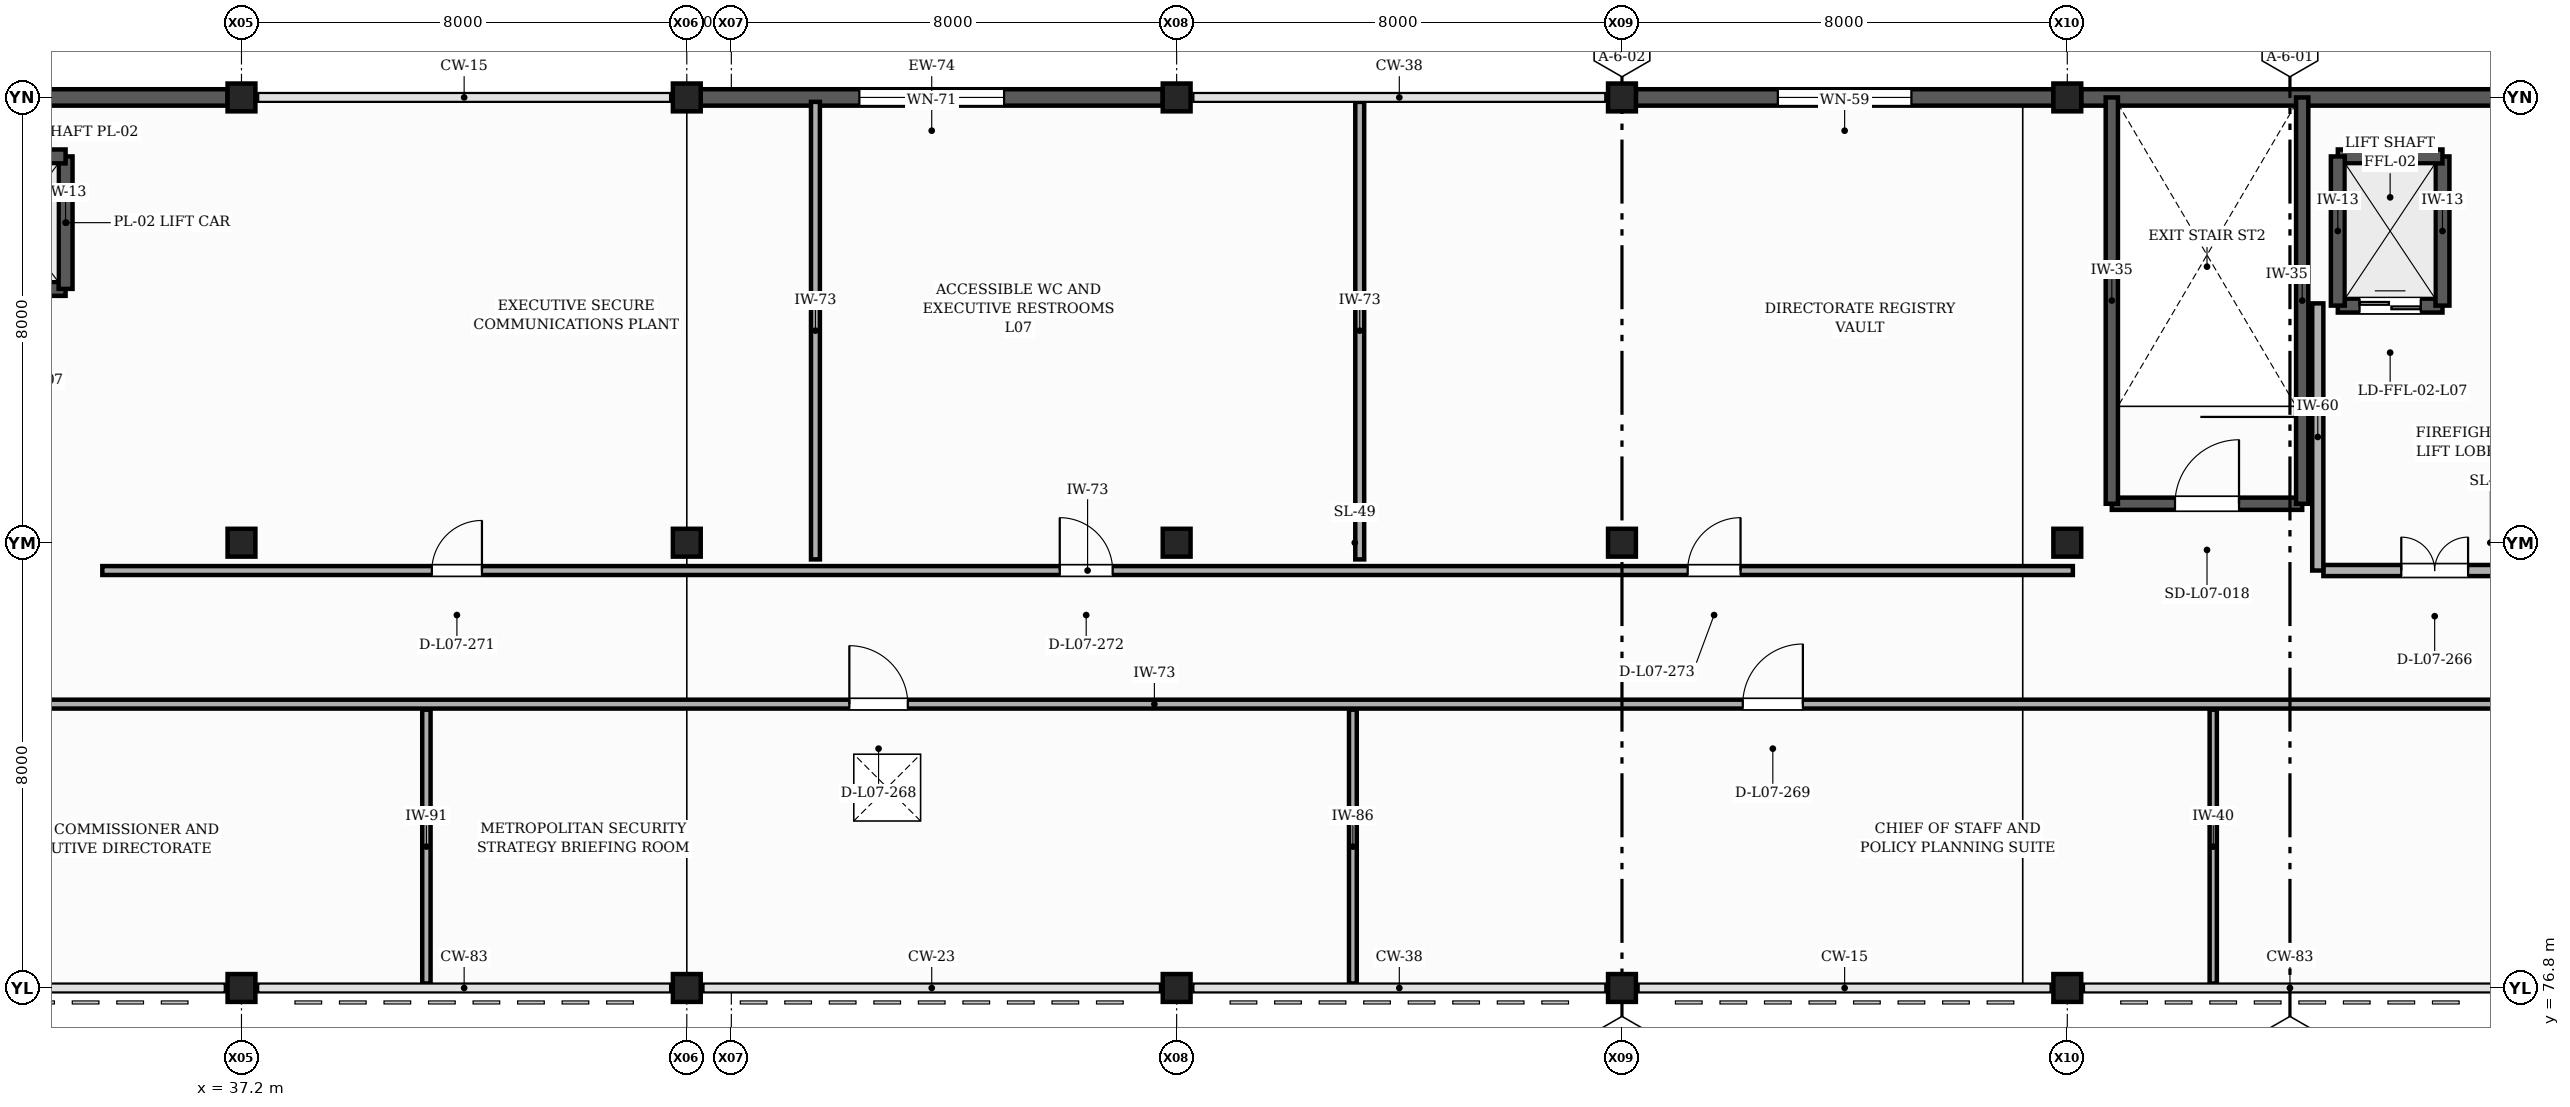
"""IFC4 building model, lengths in metres.
Left out: names, types, materials, properties, quantities, classifications, styles, units other than length and angle.
Written with IfcOpenShell. Run it as: python <this file> out.ifc"""

import sys

from ifc_helpers import new_model, si_unit, direction, frame, frame_2d, origin, origin_2d, place, context, subcontext, project, spatial, rectangle, extrude, element, fill, save


model = new_model("IFC4")
c1 = context("Model", 3, precision=1e-05, world=origin(), true_north=direction((0.0, 1.0)))
c2 = subcontext(c1, "Body", "Model", "MODEL_VIEW")
j1 = project(units=[si_unit("LENGTHUNIT", "METRE"), si_unit("PLANEANGLEUNIT", "RADIAN")], contexts=[c1])
p1 = place(None, origin())
s1 = spatial("IfcSite", under=j1, at=p1, CompositionType="ELEMENT")
p2 = place(p1, origin())
s2 = spatial("IfcBuilding", under=s1, at=p2, CompositionType="ELEMENT")
p3 = place(p2, frame((0.0, 0.0, 29.7)))
s3 = spatial("IfcBuildingStorey", under=s2, at=p3, CompositionType="ELEMENT", Elevation=29.7)
for number, where, z_axis, x_axis in (
    (1, (37.2, 76.8, 0.0), (0.0, 0.0, 1.0), (1.0, 0.0, 0.0)),
    (2, (37.2, 84.8, 0.0), (0.0, 0.0, 1.0), (1.0, 0.0, 0.0)),
    (3, (37.2, 92.8, 0.0), (0.0, 0.0, 1.0), (1.0, 0.0, 0.0)),
    (4, (45.2, 76.8, 0.0), (0.0, 0.0, 1.0), (1.0, 0.0, 0.0)),
    (5, (45.2, 84.8, 0.0), (0.0, 0.0, 1.0), (1.0, 0.0, 0.0)),
    (6, (45.2, 92.8, 0.0), (0.0, 0.0, 1.0), (1.0, 0.0, 0.0)),
    (7, (54.0, 76.8, 0.0), (0.0, 0.0, 1.0), (1.0, 0.0, 0.0)),
    (8, (54.0, 84.8, 0.0), (0.0, 0.0, 1.0), (1.0, 0.0, 0.0)),
    (9, (54.0, 92.8, 0.0), (0.0, 0.0, 1.0), (1.0, 0.0, 0.0)),
    (10, (62.0, 76.8, 0.0), (0.0, 0.0, 1.0), (1.0, 0.0, 0.0)),
    (11, (62.0, 84.8, 0.0), (0.0, 0.0, 1.0), (1.0, 0.0, 0.0)),
    (12, (62.0, 92.8, 0.0), (0.0, 0.0, 1.0), (1.0, 0.0, 0.0)),
    (13, (70.0, 76.8, 0.0), (0.0, 0.0, 1.0), (1.0, 0.0, 0.0)),
    (14, (70.0, 84.8, 0.0), (0.0, 0.0, 1.0), (1.0, 0.0, 0.0)),
    (15, (70.0, 92.8, 0.0), (0.0, 0.0, 1.0), (1.0, 0.0, 0.0)),
):
    element("IfcColumn", number, at=place(p3, frame(where, z_axis=z_axis, x_axis=x_axis)), inside=s3, PredefinedType="COLUMN", context=c2, shape_type="SweptSolid", body=[
        extrude(rectangle(XDim=0.5, YDim=0.5, at=origin_2d()), origin(), (0.0, 0.0, 1.0), 3.9),
    ])
p4 = place(p3, frame((77.75, 92.8, 0.0), z_axis=(0.0, 0.0, 1.0), x_axis=(-1.0, 0.0, 0.0)))
e16 = element("IfcWall", 16, at=p4, inside=s3, PredefinedType="SOLIDWALL", context=c2, shape_type="SweptSolid", body=[
    extrude(rectangle(XDim=7.5, YDim=0.295, at=frame_2d((3.75, 0.0))), origin(), (0.0, 0.0, 1.0), 3.64),
])
p5 = place(p3, frame((69.75, 92.8, 0.0), z_axis=(0.0, 0.0, 1.0), x_axis=(-1.0, 0.0, 0.0)))
e17 = element("IfcWall", 17, at=p5, inside=s3, PredefinedType="SOLIDWALL", context=c2, shape_type="SweptSolid", body=[
    extrude(rectangle(XDim=7.5, YDim=0.295, at=frame_2d((3.75, 0.0))), origin(), (0.0, 0.0, 1.0), 2.98),
])
p6 = place(p5, frame((2.55, 0.0, 0.9)))
e18 = element("IfcOpeningElement", 18, at=p6, cuts=e17, PredefinedType="OPENING", context=c2, shape_type="SweptSolid", body=[
    extrude(rectangle(XDim=2.4, YDim=1.5, at=frame_2d((1.2, 0.75))), frame((0.0, 0.157, 0.0), z_axis=(0.0, -1.0, 0.0), x_axis=(1.0, 0.0, 0.0)), (0.0, 0.0, 1.0), 0.315),
])
p7 = place(p3, frame((53.75, 92.8, 0.0), z_axis=(0.0, 0.0, 1.0), x_axis=(-1.0, 0.0, 0.0)))
e19 = element("IfcWall", 19, at=p7, inside=s3, PredefinedType="SOLIDWALL", context=c2, shape_type="SweptSolid", body=[
    extrude(rectangle(XDim=8.3, YDim=0.295, at=frame_2d((4.15, 0.0))), origin(), (0.0, 0.0, 1.0), 2.98),
])
p8 = place(p7, frame((2.85, 0.0, 0.9)))
e20 = element("IfcOpeningElement", 20, at=p8, cuts=e19, PredefinedType="OPENING", context=c2, shape_type="SweptSolid", body=[
    extrude(rectangle(XDim=2.6, YDim=1.8, at=frame_2d((1.3, 0.9))), frame((0.0, 0.157, 0.0), z_axis=(0.0, -1.0, 0.0), x_axis=(1.0, 0.0, 0.0)), (0.0, 0.0, 1.0), 0.315),
])
p9 = place(p3, frame((36.95, 92.8, 0.0), z_axis=(0.0, 0.0, 1.0), x_axis=(-1.0, 0.0, 0.0)))
e21 = element("IfcWall", 21, at=p9, inside=s3, PredefinedType="SOLIDWALL", context=c2, shape_type="SweptSolid", body=[
    extrude(rectangle(XDim=7.5, YDim=0.295, at=frame_2d((3.75, 0.0))), origin(), (0.0, 0.0, 1.0), 2.98),
])
p10 = place(p3, frame((32.16, 89.36, 0.0), z_axis=(0.0, 0.0, 1.0), x_axis=(1.0, 0.0, 0.0)))
e22 = element("IfcWall", 22, at=p10, inside=s3, PredefinedType="SHEAR", context=c2, shape_type="SweptSolid", body=[
    extrude(rectangle(XDim=1.88, YDim=0.25, at=frame_2d((0.94, 0.0))), origin(), (0.0, 0.0, 1.0), 5.52),
])
p11 = place(p10, frame((0.39, 0.0, 0.0)))
e23 = element("IfcOpeningElement", 23, at=p11, cuts=e22, PredefinedType="OPENING", context=c2, shape_type="SweptSolid", body=[
    extrude(rectangle(XDim=1.1, YDim=2.2, at=frame_2d((0.55, 1.1))), frame((0.0, 0.135, 0.0), z_axis=(0.0, -1.0, 0.0), x_axis=(1.0, 0.0, 0.0)), (0.0, 0.0, 1.0), 0.27),
])
p12 = place(p3, frame((34.04, 89.36, 0.0), z_axis=(0.0, 0.0, 1.0), x_axis=(0.0, 1.0, 0.0)))
e24 = element("IfcWall", 24, at=p12, inside=s3, PredefinedType="SHEAR", context=c2, shape_type="SweptSolid", body=[
    extrude(rectangle(XDim=2.38, YDim=0.25, at=frame_2d((1.19, 0.0))), origin(), (0.0, 0.0, 1.0), 5.52),
])
p13 = place(p3, frame((34.04, 91.74, 0.0), z_axis=(0.0, 0.0, 1.0), x_axis=(-1.0, 0.0, 0.0)))
e25 = element("IfcWall", 25, at=p13, inside=s3, PredefinedType="SHEAR", context=c2, shape_type="SweptSolid", body=[
    extrude(rectangle(XDim=1.88, YDim=0.25, at=frame_2d((0.94, 0.0))), origin(), (0.0, 0.0, 1.0), 5.52),
])
p14 = place(p3, frame((70.8, 85.5, 0.0), z_axis=(0.0, 0.0, 1.0), x_axis=(1.0, 0.0, 0.0)))
e26 = element("IfcWall", 26, at=p14, inside=s3, PredefinedType="SHEAR", context=c2, shape_type="SweptSolid", body=[
    extrude(rectangle(XDim=3.42, YDim=0.22, at=frame_2d((1.71, 0.0))), origin(), (0.0, 0.0, 1.0), 3.9),
])
p15 = place(p14, frame((1.135, 0.0, 0.0)))
e27 = element("IfcOpeningElement", 27, at=p15, cuts=e26, PredefinedType="OPENING", context=c2, shape_type="SweptSolid", body=[
    extrude(rectangle(XDim=1.15, YDim=2.15, at=frame_2d((0.575, 1.075))), frame((0.0, 0.12, 0.0), z_axis=(0.0, -1.0, 0.0), x_axis=(1.0, 0.0, 0.0)), (0.0, 0.0, 1.0), 0.24),
])
for number, where, z_axis, x_axis in (
    (28, (74.22, 85.5, 0.0), (0.0, 0.0, 1.0), (0.0, 1.0, 0.0)),
    (29, (70.8, 92.8, 0.0), (0.0, 0.0, 1.0), (0.0, -1.0, 0.0)),
):
    element("IfcWall", number, at=place(p3, frame(where, z_axis=z_axis, x_axis=x_axis)), inside=s3, PredefinedType="SHEAR", context=c2, shape_type="SweptSolid", body=[
        extrude(rectangle(XDim=7.3, YDim=0.22, at=frame_2d((3.65, 0.0))), origin(), (0.0, 0.0, 1.0), 3.9),
    ])
p16 = place(p3, frame((74.86, 89.06, 0.0), z_axis=(0.0, 0.0, 1.0), x_axis=(1.0, 0.0, 0.0)))
e30 = element("IfcWall", 30, at=p16, inside=s3, PredefinedType="SHEAR", context=c2, shape_type="SweptSolid", body=[
    extrude(rectangle(XDim=1.88, YDim=0.25, at=frame_2d((0.94, 0.0))), origin(), (0.0, 0.0, 1.0), 5.52),
])
p17 = place(p16, frame((0.39, 0.0, 0.0)))
e31 = element("IfcOpeningElement", 31, at=p17, cuts=e30, PredefinedType="OPENING", context=c2, shape_type="SweptSolid", body=[
    extrude(rectangle(XDim=1.1, YDim=2.2, at=frame_2d((0.55, 1.1))), frame((0.0, 0.135, 0.0), z_axis=(0.0, -1.0, 0.0), x_axis=(1.0, 0.0, 0.0)), (0.0, 0.0, 1.0), 0.27),
])
p18 = place(p3, frame((76.74, 89.06, 0.0), z_axis=(0.0, 0.0, 1.0), x_axis=(0.0, 1.0, 0.0)))
e32 = element("IfcWall", 32, at=p18, inside=s3, PredefinedType="SHEAR", context=c2, shape_type="SweptSolid", body=[
    extrude(rectangle(XDim=2.68, YDim=0.25, at=frame_2d((1.34, 0.0))), origin(), (0.0, 0.0, 1.0), 5.52),
])
p19 = place(p3, frame((76.74, 91.74, 0.0), z_axis=(0.0, 0.0, 1.0), x_axis=(-1.0, 0.0, 0.0)))
e33 = element("IfcWall", 33, at=p19, inside=s3, PredefinedType="SHEAR", context=c2, shape_type="SweptSolid", body=[
    extrude(rectangle(XDim=1.88, YDim=0.25, at=frame_2d((0.94, 0.0))), origin(), (0.0, 0.0, 1.0), 5.52),
])
p20 = place(p3, frame((74.86, 91.74, 0.0), z_axis=(0.0, 0.0, 1.0), x_axis=(0.0, -1.0, 0.0)))
e34 = element("IfcWall", 34, at=p20, inside=s3, PredefinedType="SHEAR", context=c2, shape_type="SweptSolid", body=[
    extrude(rectangle(XDim=2.68, YDim=0.25, at=frame_2d((1.34, 0.0))), origin(), (0.0, 0.0, 1.0), 5.52),
])
p21 = place(p3, frame((74.6, 84.3, 0.0), z_axis=(0.0, 0.0, 1.0), x_axis=(1.0, 0.0, 0.0)))
e35 = element("IfcWall", 35, at=p21, inside=s3, PredefinedType="PARTITIONING", context=c2, shape_type="SweptSolid", body=[
    extrude(rectangle(XDim=4.0, YDim=0.2, at=frame_2d((2.0, 0.0))), origin(), (0.0, 0.0, 1.0), 2.915),
])
p22 = place(p21, frame((1.4, 0.0, 0.0)))
e36 = element("IfcOpeningElement", 36, at=p22, cuts=e35, PredefinedType="OPENING", context=c2, shape_type="SweptSolid", body=[
    extrude(rectangle(XDim=1.2, YDim=2.15, at=frame_2d((0.6, 1.075))), frame((0.0, 0.11, 0.0), z_axis=(0.0, -1.0, 0.0), x_axis=(1.0, 0.0, 0.0)), (0.0, 0.0, 1.0), 0.22),
])
p23 = place(p3, frame((74.5, 84.3, 0.0), z_axis=(0.0, 0.0, 1.0), x_axis=(0.0, 1.0, 0.0)))
e37 = element("IfcWall", 37, at=p23, inside=s3, PredefinedType="PARTITIONING", context=c2, shape_type="SweptSolid", body=[
    extrude(rectangle(XDim=4.8, YDim=0.2, at=frame_2d((2.4, 0.0))), origin(), (0.0, 0.0, 1.0), 3.065),
])
p24 = place(p3, frame((40.522, 76.88, 0.0), z_axis=(0.0, 0.0, 1.0), x_axis=(0.0, 1.0, 0.0)))
e38 = element("IfcWall", 38, at=p24, inside=s3, PredefinedType="PARTITIONING", context=c2, shape_type="SweptSolid", body=[
    extrude(rectangle(XDim=4.92, YDim=0.15, at=frame_2d((2.46, 0.0))), origin(), (0.0, 0.0, 1.0), 2.965),
])
p25 = place(p3, frame((57.166, 76.88, 0.0), z_axis=(0.0, 0.0, 1.0), x_axis=(0.0, 1.0, 0.0)))
e39 = element("IfcWall", 39, at=p25, inside=s3, PredefinedType="PARTITIONING", context=c2, shape_type="SweptSolid", body=[
    extrude(rectangle(XDim=4.92, YDim=0.14, at=frame_2d((2.46, 0.0))), origin(), (0.0, 0.0, 1.0), 2.965),
])
p26 = place(p3, frame((72.622, 76.88, 0.0), z_axis=(0.0, 0.0, 1.0), x_axis=(0.0, 1.0, 0.0)))
e40 = element("IfcWall", 40, at=p26, inside=s3, PredefinedType="PARTITIONING", context=c2, shape_type="SweptSolid", body=[
    extrude(rectangle(XDim=4.92, YDim=0.13, at=frame_2d((2.46, 0.0))), origin(), (0.0, 0.0, 1.0), 2.965),
])
p27 = place(p3, frame((21.28, 81.9, 0.0), z_axis=(0.0, 0.0, 1.0), x_axis=(1.0, 0.0, 0.0)))
e41 = element("IfcWall", 41, at=p27, inside=s3, PredefinedType="PARTITIONING", context=c2, shape_type="SweptSolid", body=[
    extrude(rectangle(XDim=64.64, YDim=0.16, at=frame_2d((32.32, 0.0))), origin(), (0.0, 0.0, 1.0), 2.915),
])
p28 = place(p27, frame((8.97, 0.0, 0.0)))
e42 = element("IfcOpeningElement", 42, at=p28, cuts=e41, PredefinedType="OPENING", context=c2, shape_type="SweptSolid", body=[
    extrude(rectangle(XDim=1.02, YDim=2.12, at=frame_2d((0.51, 1.06))), frame((0.0, 0.09, 0.0), z_axis=(0.0, -1.0, 0.0), x_axis=(1.0, 0.0, 0.0)), (0.0, 0.0, 1.0), 0.18),
])
p29 = place(p27, frame((26.84, 0.0, 0.0)))
e43 = element("IfcOpeningElement", 43, at=p29, cuts=e41, PredefinedType="OPENING", context=c2, shape_type="SweptSolid", body=[
    extrude(rectangle(XDim=1.05, YDim=2.1, at=frame_2d((0.525, 1.05))), frame((0.0, 0.09, 0.0), z_axis=(0.0, -1.0, 0.0), x_axis=(1.0, 0.0, 0.0)), (0.0, 0.0, 1.0), 0.18),
])
p30 = place(p27, frame((42.89, 0.0, 0.0)))
e44 = element("IfcOpeningElement", 44, at=p30, cuts=e41, PredefinedType="OPENING", context=c2, shape_type="SweptSolid", body=[
    extrude(rectangle(XDim=1.08, YDim=2.14, at=frame_2d((0.54, 1.07))), frame((0.0, 0.09, 0.0), z_axis=(0.0, -1.0, 0.0), x_axis=(1.0, 0.0, 0.0)), (0.0, 0.0, 1.0), 0.18),
])
p31 = place(p27, frame((57.2, 0.0, 0.0)))
e45 = element("IfcOpeningElement", 45, at=p31, cuts=e41, PredefinedType="OPENING", context=c2, shape_type="SweptSolid", body=[
    extrude(rectangle(XDim=1.1, YDim=2.1, at=frame_2d((0.55, 1.05))), frame((0.0, 0.09, 0.0), z_axis=(0.0, -1.0, 0.0), x_axis=(1.0, 0.0, 0.0)), (0.0, 0.0, 1.0), 0.18),
])
p32 = place(p3, frame((47.511, 84.5, 0.0), z_axis=(0.0, 0.0, 1.0), x_axis=(0.0, 1.0, 0.0)))
e46 = element("IfcWall", 46, at=p32, inside=s3, PredefinedType="PARTITIONING", context=c2, shape_type="SweptSolid", body=[
    extrude(rectangle(XDim=8.22, YDim=0.16, at=frame_2d((4.11, 0.0))), origin(), (0.0, 0.0, 1.0), 2.915),
])
p33 = place(p3, frame((57.289, 84.5, 0.0), z_axis=(0.0, 0.0, 1.0), x_axis=(0.0, 1.0, 0.0)))
e47 = element("IfcWall", 47, at=p33, inside=s3, PredefinedType="PARTITIONING", context=c2, shape_type="SweptSolid", body=[
    extrude(rectangle(XDim=8.22, YDim=0.16, at=frame_2d((4.11, 0.0))), origin(), (0.0, 0.0, 1.0), 2.965),
])
p34 = place(p3, frame((34.7, 84.3, 0.0), z_axis=(0.0, 0.0, 1.0), x_axis=(1.0, 0.0, 0.0)))
e48 = element("IfcWall", 48, at=p34, inside=s3, PredefinedType="PARTITIONING", context=c2, shape_type="SweptSolid", body=[
    extrude(rectangle(XDim=35.4, YDim=0.16, at=frame_2d((17.7, 0.0))), origin(), (0.0, 0.0, 1.0), 2.915),
])
p35 = place(p34, frame((5.92, 0.0, 0.0)))
e49 = element("IfcOpeningElement", 49, at=p35, cuts=e48, PredefinedType="OPENING", context=c2, shape_type="SweptSolid", body=[
    extrude(rectangle(XDim=0.9, YDim=2.1, at=frame_2d((0.45, 1.05))), frame((0.0, 0.09, 0.0), z_axis=(0.0, -1.0, 0.0), x_axis=(1.0, 0.0, 0.0)), (0.0, 0.0, 1.0), 0.18),
])
p36 = place(p34, frame((17.2, 0.0, 0.0)))
e50 = element("IfcOpeningElement", 50, at=p36, cuts=e48, PredefinedType="OPENING", context=c2, shape_type="SweptSolid", body=[
    extrude(rectangle(XDim=0.95, YDim=2.15, at=frame_2d((0.475, 1.075))), frame((0.0, 0.09, 0.0), z_axis=(0.0, -1.0, 0.0), x_axis=(1.0, 0.0, 0.0)), (0.0, 0.0, 1.0), 0.18),
])
p37 = place(p34, frame((28.48, 0.0, 0.0)))
e51 = element("IfcOpeningElement", 51, at=p37, cuts=e48, PredefinedType="OPENING", context=c2, shape_type="SweptSolid", body=[
    extrude(rectangle(XDim=0.95, YDim=2.1, at=frame_2d((0.475, 1.05))), frame((0.0, 0.09, 0.0), z_axis=(0.0, -1.0, 0.0), x_axis=(1.0, 0.0, 0.0)), (0.0, 0.0, 1.0), 0.18),
])
p38 = place(p6, origin())
e52 = element("IfcWindow", 52, at=p38, inside=s3, PartitioningType="SINGLE_PANEL", PredefinedType="WINDOW", context=c2, shape_type="SweptSolid", body=[
    extrude(rectangle(XDim=2.4, YDim=1.5, at=frame_2d((1.2, 0.75))), frame((0.0, 0.03, 0.0), z_axis=(0.0, -1.0, 0.0), x_axis=(1.0, 0.0, 0.0)), (0.0, 0.0, 1.0), 0.06),
])
fill(e18, e52)
p39 = place(p8, origin())
e53 = element("IfcWindow", 53, at=p39, inside=s3, PartitioningType="SINGLE_PANEL", PredefinedType="WINDOW", context=c2, shape_type="SweptSolid", body=[
    extrude(rectangle(XDim=2.6, YDim=1.8, at=frame_2d((1.3, 0.9))), frame((0.0, 0.03, 0.0), z_axis=(0.0, -1.0, 0.0), x_axis=(1.0, 0.0, 0.0)), (0.0, 0.0, 1.0), 0.06),
])
fill(e20, e53)
p40 = place(p15, origin())
e54 = element("IfcDoor", 54, at=p40, inside=s3, OperationType="SINGLE_SWING_RIGHT", PredefinedType="DOOR", context=c2, shape_type="SweptSolid", body=[
    extrude(rectangle(XDim=1.15, YDim=2.15, at=frame_2d((0.575, 1.075))), frame((0.0, 0.025, 0.0), z_axis=(0.0, -1.0, 0.0), x_axis=(1.0, 0.0, 0.0)), (0.0, 0.0, 1.0), 0.05),
])
fill(e27, e54)
p41 = place(p17, origin())
e55 = element("IfcDoor", 55, at=p41, inside=s3, OperationType="DOUBLE_DOOR_SLIDING", PredefinedType="DOOR", context=c2, shape_type="SweptSolid", body=[
    extrude(rectangle(XDim=1.1, YDim=2.2, at=frame_2d((0.55, 1.1))), frame((0.0, 0.025, 0.0), z_axis=(0.0, -1.0, 0.0), x_axis=(1.0, 0.0, 0.0)), (0.0, 0.0, 1.0), 0.05),
])
fill(e31, e55)
p42 = place(p22, origin())
e56 = element("IfcDoor", 56, at=p42, inside=s3, OperationType="DOUBLE_DOOR_SINGLE_SWING", PredefinedType="DOOR", context=c2, shape_type="SweptSolid", body=[
    extrude(rectangle(XDim=1.2, YDim=2.15, at=frame_2d((0.6, 1.075))), frame((0.0, 0.025, 0.0), z_axis=(0.0, -1.0, 0.0), x_axis=(1.0, 0.0, 0.0)), (0.0, 0.0, 1.0), 0.05),
])
fill(e36, e56)
p43 = place(p29, origin())
e57 = element("IfcDoor", 57, at=p43, inside=s3, OperationType="SINGLE_SWING_LEFT", PredefinedType="DOOR", context=c2, shape_type="SweptSolid", body=[
    extrude(rectangle(XDim=1.05, YDim=2.1, at=frame_2d((0.525, 1.05))), frame((0.0, 0.025, 0.0), z_axis=(0.0, -1.0, 0.0), x_axis=(1.0, 0.0, 0.0)), (0.0, 0.0, 1.0), 0.05),
])
fill(e43, e57)
p44 = place(p30, origin())
e58 = element("IfcDoor", 58, at=p44, inside=s3, OperationType="SINGLE_SWING_RIGHT", PredefinedType="DOOR", context=c2, shape_type="SweptSolid", body=[
    extrude(rectangle(XDim=1.08, YDim=2.14, at=frame_2d((0.54, 1.07))), frame((0.0, 0.025, 0.0), z_axis=(0.0, -1.0, 0.0), x_axis=(1.0, 0.0, 0.0)), (0.0, 0.0, 1.0), 0.05),
])
fill(e44, e58)
p45 = place(p35, origin())
e59 = element("IfcDoor", 59, at=p45, inside=s3, OperationType="SINGLE_SWING_RIGHT", PredefinedType="DOOR", context=c2, shape_type="SweptSolid", body=[
    extrude(rectangle(XDim=0.9, YDim=2.1, at=frame_2d((0.45, 1.05))), frame((0.0, 0.025, 0.0), z_axis=(0.0, -1.0, 0.0), x_axis=(1.0, 0.0, 0.0)), (0.0, 0.0, 1.0), 0.05),
])
fill(e49, e59)
p46 = place(p36, origin())
e60 = element("IfcDoor", 60, at=p46, inside=s3, OperationType="SINGLE_SWING_LEFT", PredefinedType="DOOR", context=c2, shape_type="SweptSolid", body=[
    extrude(rectangle(XDim=0.95, YDim=2.15, at=frame_2d((0.475, 1.075))), frame((0.0, 0.025, 0.0), z_axis=(0.0, -1.0, 0.0), x_axis=(1.0, 0.0, 0.0)), (0.0, 0.0, 1.0), 0.05),
])
fill(e50, e60)
p47 = place(p37, origin())
e61 = element("IfcDoor", 61, at=p47, inside=s3, OperationType="SINGLE_SWING_RIGHT", PredefinedType="DOOR", context=c2, shape_type="SweptSolid", body=[
    extrude(rectangle(XDim=0.95, YDim=2.1, at=frame_2d((0.475, 1.05))), frame((0.0, 0.025, 0.0), z_axis=(0.0, -1.0, 0.0), x_axis=(1.0, 0.0, 0.0)), (0.0, 0.0, 1.0), 0.05),
])
fill(e51, e61)
save(model, sys.argv[1])
